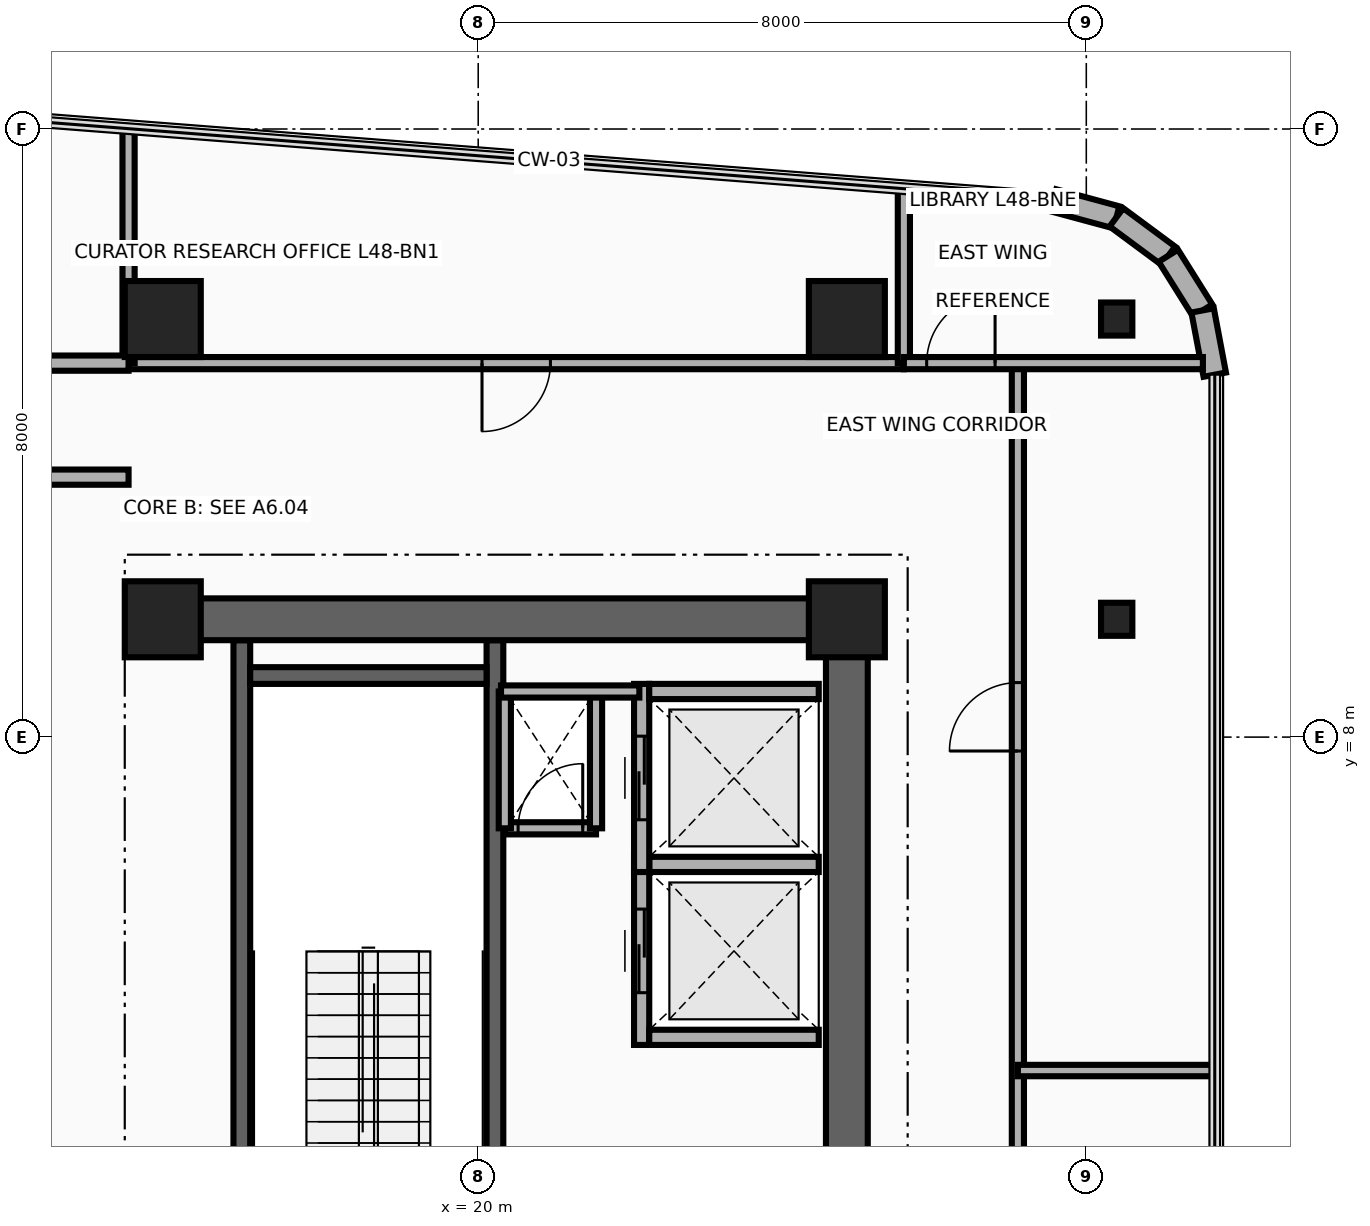
"""IFC4 building model, lengths in metres.
Left out: names, types, materials, properties, quantities, classifications, styles, units other than length and angle.
Written with IfcOpenShell. Run it as: python <this file> out.ifc"""

import sys

from ifc_helpers import new_model, si_unit, direction, frame, frame_2d, origin, origin_2d, place, context, subcontext, project, spatial, rectangle, i_section, extrude, source, transform, mapped, element, fill, save


model = new_model("IFC4")
c1 = context("Model", 3, precision=1e-05, world=origin(), true_north=direction((0.0, 1.0)))
c2 = subcontext(c1, "Body", "Model", "MODEL_VIEW")
j1 = project(units=[si_unit("LENGTHUNIT", "METRE"), si_unit("PLANEANGLEUNIT", "RADIAN")], contexts=[c1])
p1 = place(None, origin())
s1 = spatial("IfcSite", under=j1, at=p1, CompositionType="ELEMENT")
p2 = place(p1, origin())
s2 = spatial("IfcBuilding", under=s1, at=p2, CompositionType="ELEMENT")
p3 = place(p2, frame((0.0, 0.0, 188.4)))
s3 = spatial("IfcBuildingStorey", under=s2, at=p3, CompositionType="ELEMENT", Elevation=188.4)
for number, where, z_axis, x_axis in (
    (1, (16.89, 0.68, 0.0), (0.0, 0.0, 1.0), (0.0, 1.0, 0.0)),
    (2, (20.22, 0.68, 0.0), (0.0, 0.0, 1.0), (0.0, 1.0, 0.0)),
):
    element("IfcWall", number, at=place(p3, frame(where, z_axis=z_axis, x_axis=x_axis)), inside=s3, PredefinedType="SHEAR", context=c2, shape_type="SweptSolid", body=[
        extrude(rectangle(XDim=8.595, YDim=0.22, at=frame_2d((4.297, 0.0))), origin(), (0.0, 0.0, 1.0), 3.63),
    ])
p4 = place(p3, frame((17.0, 8.81, 0.0), z_axis=(0.0, 0.0, 1.0), x_axis=(1.0, 0.0, 0.0)))
e3 = element("IfcWall", 3, at=p4, inside=s3, PredefinedType="SHEAR", context=c2, shape_type="SweptSolid", body=[
    extrude(rectangle(XDim=3.11, YDim=0.22, at=frame_2d((1.555, 0.0))), origin(), (0.0, 0.0, 1.0), 3.63),
])
p5 = place(p3, frame((24.85, 0.95, 0.0), z_axis=(0.0, 0.0, 1.0), x_axis=(0.0, 1.0, 0.0)))
e4 = element("IfcWall", 4, at=p5, inside=s3, PredefinedType="SHEAR", context=c2, shape_type="SweptSolid", body=[
    extrude(rectangle(XDim=8.875, YDim=0.55, at=frame_2d((4.438, 0.0))), origin(), (0.0, 0.0, 1.0), 3.63),
])
p6 = place(p3, frame((15.85, 9.55, 0.0), z_axis=(0.0, 0.0, 1.0), x_axis=(1.0, 0.0, 0.0)))
e5 = element("IfcWall", 5, at=p6, inside=s3, PredefinedType="SHEAR", context=c2, shape_type="SweptSolid", body=[
    extrude(rectangle(XDim=9.0, YDim=0.55, at=frame_2d((4.5, 0.0))), origin(), (0.0, 0.0, 1.0), 3.63),
])
m1 = source(origin(), c2, "Body", "SweptSolid", [
    extrude(rectangle(XDim=1.0, YDim=1.0, at=origin_2d()), origin(), (0.0, 0.0, 1.0), 3.95),
])
for number, where, z_axis, x_axis in (
    (6, (15.85, 9.55, 0.0), (0.0, 0.0, 1.0), (1.0, 0.0, 0.0)),
    (7, (24.85, 9.55, 0.0), (0.0, 0.0, 1.0), (1.0, 0.0, 0.0)),
):
    element("IfcColumn", number, at=place(p3, frame(where, z_axis=z_axis, x_axis=x_axis)), inside=s3, PredefinedType="COLUMN", context=c2, shape_type="MappedRepresentation", body=[
        mapped(m1, transform((0.0, 0.0, 0.0), x_axis=(1.0, 0.0, 0.0), y_axis=(0.0, 1.0, 0.0), z_axis=(0.0, 0.0, 1.0), scale=1.0)),
    ])
m2 = source(origin(), c2, "Body", "SweptSolid", [
    extrude(i_section(OverallWidth=0.412, OverallDepth=0.435, WebThickness=0.036, FlangeThickness=0.057, at=origin_2d()), origin(), (0.0, 0.0, 1.0), 3.95),
])
p7 = place(p3, frame((28.4, 9.55, 0.0), z_axis=(0.0, 0.0, 1.0), x_axis=(1.0, 0.0, 0.0)))
e8 = element("IfcColumn", 8, at=p7, inside=s3, PredefinedType="COLUMN", context=c2, shape_type="MappedRepresentation", body=[
    mapped(m2, transform((0.0, 0.0, 0.0), x_axis=(1.0, 0.0, 0.0), y_axis=(0.0, 1.0, 0.0), z_axis=(0.0, 0.0, 1.0), scale=1.0)),
])
for number, where, z_axis, x_axis in (
    (9, (15.85, 13.5, 0.0), (0.0, 0.0, 1.0), (1.0, 0.0, 0.0)),
    (10, (24.85, 13.5, 0.0), (0.0, 0.0, 1.0), (1.0, 0.0, 0.0)),
):
    element("IfcColumn", number, at=place(p3, frame(where, z_axis=z_axis, x_axis=x_axis)), inside=s3, PredefinedType="COLUMN", context=c2, shape_type="MappedRepresentation", body=[
        mapped(m1, transform((0.0, 0.0, 0.0), x_axis=(1.0, 0.0, 0.0), y_axis=(0.0, 1.0, 0.0), z_axis=(0.0, 0.0, 1.0), scale=1.0)),
    ])
p8 = place(p3, frame((28.4, 13.5, 0.0), z_axis=(0.0, 0.0, 1.0), x_axis=(1.0, 0.0, 0.0)))
e11 = element("IfcColumn", 11, at=p8, inside=s3, PredefinedType="COLUMN", context=c2, shape_type="MappedRepresentation", body=[
    mapped(m2, transform((0.0, 0.0, 0.0), x_axis=(1.0, 0.0, 0.0), y_axis=(0.0, 1.0, 0.0), z_axis=(0.0, 0.0, 1.0), scale=1.0)),
])
p9 = place(p3, frame((27.566, 15.062, 0.0), z_axis=(0.0, 0.0, 1.0), x_axis=(0.965357594382, -0.260930479187, 0.0)))
e12 = element("IfcWall", 12, at=p9, inside=s3, PredefinedType="SOLIDWALL", context=c2, shape_type="SweptSolid", body=[
    extrude(rectangle(XDim=0.86, YDim=0.3, at=frame_2d((0.43, 0.0))), origin(), (0.0, 0.0, 1.0), 3.63),
])
p10 = place(p3, frame((28.396, 14.838, 0.0), z_axis=(0.0, 0.0, 1.0), x_axis=(0.803847397988, -0.594835574548, 0.0)))
e13 = element("IfcWall", 13, at=p10, inside=s3, PredefinedType="SOLIDWALL", context=c2, shape_type="SweptSolid", body=[
    extrude(rectangle(XDim=0.849, YDim=0.3, at=frame_2d((0.425, 0.0))), origin(), (0.0, 0.0, 1.0), 3.63),
])
p11 = place(p3, frame((29.079, 14.333, 0.0), z_axis=(0.0, 0.0, 1.0), x_axis=(0.53134147342, -0.847157741288, 0.0)))
e14 = element("IfcWall", 14, at=p11, inside=s3, PredefinedType="SOLIDWALL", context=c2, shape_type="SweptSolid", body=[
    extrude(rectangle(XDim=0.85, YDim=0.3, at=frame_2d((0.425, 0.0))), origin(), (0.0, 0.0, 1.0), 3.63),
])
p12 = place(p3, frame((29.531, 13.613, 0.0), z_axis=(0.0, 0.0, 1.0), x_axis=(0.185402686284, -0.982662629756, 0.0)))
e15 = element("IfcWall", 15, at=p12, inside=s3, PredefinedType="SOLIDWALL", context=c2, shape_type="SweptSolid", body=[
    extrude(rectangle(XDim=0.86, YDim=0.3, at=frame_2d((0.43, 0.0))), origin(), (0.0, 0.0, 1.0), 3.63),
])
p13 = place(p3, frame((22.15, 3.95, 0.0), z_axis=(0.0, 0.0, 1.0), x_axis=(0.0, 1.0, 0.0)))
e16 = element("IfcWall", 16, at=p13, inside=s3, PredefinedType="MOVABLE", context=c2, shape_type="SweptSolid", body=[
    extrude(rectangle(XDim=2.475, YDim=0.2, at=frame_2d((1.238, 0.0))), origin(), (0.0, 0.0, 1.0), 3.63),
])
p14 = place(p13, frame((0.688, 0.0, 0.0)))
e17 = element("IfcOpeningElement", 17, at=p14, cuts=e16, PredefinedType="OPENING", context=c2, shape_type="SweptSolid", body=[
    extrude(rectangle(XDim=1.1, YDim=2.1, at=frame_2d((0.55, 1.05))), frame((0.0, 0.115, 0.0), z_axis=(0.0, -1.0, 0.0), x_axis=(1.0, 0.0, 0.0)), (0.0, 0.0, 1.0), 0.23),
])
for number, where, z_axis, x_axis in (
    (18, (22.25, 4.05, 0.0), (0.0, 0.0, 1.0), (1.0, 0.0, 0.0)),
    (19, (22.25, 6.325, 0.0), (0.0, 0.0, 1.0), (1.0, 0.0, 0.0)),
):
    element("IfcWall", number, at=place(p3, frame(where, z_axis=z_axis, x_axis=x_axis)), inside=s3, PredefinedType="MOVABLE", context=c2, shape_type="SweptSolid", body=[
        extrude(rectangle(XDim=2.23, YDim=0.2, at=frame_2d((1.115, 0.0))), origin(), (0.0, 0.0, 1.0), 3.63),
    ])
p15 = place(p3, frame((22.15, 6.225, 0.0), z_axis=(0.0, 0.0, 1.0), x_axis=(0.0, 1.0, 0.0)))
e20 = element("IfcWall", 20, at=p15, inside=s3, PredefinedType="MOVABLE", context=c2, shape_type="SweptSolid", body=[
    extrude(rectangle(XDim=2.475, YDim=0.2, at=frame_2d((1.237, 0.0))), origin(), (0.0, 0.0, 1.0), 3.63),
])
p16 = place(p15, frame((0.688, 0.0, 0.0)))
e21 = element("IfcOpeningElement", 21, at=p16, cuts=e20, PredefinedType="OPENING", context=c2, shape_type="SweptSolid", body=[
    extrude(rectangle(XDim=1.1, YDim=2.1, at=frame_2d((0.55, 1.05))), frame((0.0, 0.115, 0.0), z_axis=(0.0, -1.0, 0.0), x_axis=(1.0, 0.0, 0.0)), (0.0, 0.0, 1.0), 0.23),
])
p17 = place(p3, frame((22.25, 8.6, 0.0), z_axis=(0.0, 0.0, 1.0), x_axis=(1.0, 0.0, 0.0)))
e22 = element("IfcWall", 22, at=p17, inside=s3, PredefinedType="MOVABLE", context=c2, shape_type="SweptSolid", body=[
    extrude(rectangle(XDim=2.23, YDim=0.2, at=frame_2d((1.115, 0.0))), origin(), (0.0, 0.0, 1.0), 3.63),
])
p18 = place(p3, frame((20.35, 6.8, 0.0), z_axis=(0.0, 0.0, 1.0), x_axis=(1.0, 0.0, 0.0)))
e23 = element("IfcWall", 23, at=p18, inside=s3, PredefinedType="PARTITIONING", context=c2, shape_type="SweptSolid", body=[
    extrude(rectangle(XDim=1.2, YDim=0.16, at=frame_2d((0.6, 0.0))), origin(), (0.0, 0.0, 1.0), 3.63),
])
p19 = place(p18, frame((0.175, 0.0, 0.0)))
e24 = element("IfcOpeningElement", 24, at=p19, cuts=e23, PredefinedType="OPENING", context=c2, shape_type="SweptSolid", body=[
    extrude(rectangle(XDim=0.85, YDim=2.05, at=frame_2d((0.425, 1.025))), frame((0.0, 0.095, 0.0), z_axis=(0.0, -1.0, 0.0), x_axis=(1.0, 0.0, 0.0)), (0.0, 0.0, 1.0), 0.19),
])
for number, where, z_axis, x_axis in (
    (25, (21.55, 6.8, 0.0), (0.0, 0.0, 1.0), (0.0, 1.0, 0.0)),
    (26, (20.35, 6.8, 0.0), (0.0, 0.0, 1.0), (0.0, 1.0, 0.0)),
):
    element("IfcWall", number, at=place(p3, frame(where, z_axis=z_axis, x_axis=x_axis)), inside=s3, PredefinedType="PARTITIONING", context=c2, shape_type="SweptSolid", body=[
        extrude(rectangle(XDim=1.8, YDim=0.16, at=frame_2d((0.9, 0.0))), origin(), (0.0, 0.0, 1.0), 3.63),
    ])
p20 = place(p3, frame((20.3, 8.6, 0.0), z_axis=(0.0, 0.0, 1.0), x_axis=(1.0, 0.0, 0.0)))
e27 = element("IfcWall", 27, at=p20, inside=s3, PredefinedType="PARTITIONING", context=c2, shape_type="SweptSolid", body=[
    extrude(rectangle(XDim=1.82, YDim=0.16, at=frame_2d((0.91, 0.0))), origin(), (0.0, 0.0, 1.0), 3.63),
])
p21 = place(p3, frame((15.4, 12.92, 0.0), z_axis=(0.0, 0.0, 1.0), x_axis=(1.0, 0.0, 0.0)))
e28 = element("IfcWall", 28, at=p21, inside=s3, PredefinedType="PARTITIONING", context=c2, shape_type="SweptSolid", body=[
    extrude(rectangle(XDim=10.2, YDim=0.16, at=frame_2d((5.1, 0.0))), origin(), (0.0, 0.0, 1.0), 3.004),
])
p22 = place(p21, frame((4.65, 0.0, 0.0)))
e29 = element("IfcOpeningElement", 29, at=p22, cuts=e28, PredefinedType="OPENING", context=c2, shape_type="SweptSolid", body=[
    extrude(rectangle(XDim=0.9, YDim=2.1, at=frame_2d((0.45, 1.05))), frame((0.0, 0.095, 0.0), z_axis=(0.0, -1.0, 0.0), x_axis=(1.0, 0.0, 0.0)), (0.0, 0.0, 1.0), 0.19),
])
p23 = place(p3, frame((15.4, 12.92, 0.0), z_axis=(0.0, 0.0, 1.0), x_axis=(0.0, 1.0, 0.0)))
e30 = element("IfcWall", 30, at=p23, inside=s3, PredefinedType="PARTITIONING", context=c2, shape_type="SweptSolid", body=[
    extrude(rectangle(XDim=3.084, YDim=0.16, at=frame_2d((1.542, 0.0))), origin(), (0.0, 0.0, 1.0), 2.665),
])
p24 = place(p3, frame((25.6, 12.92, 0.0), z_axis=(0.0, 0.0, 1.0), x_axis=(0.0, 1.0, 0.0)))
e31 = element("IfcWall", 31, at=p24, inside=s3, PredefinedType="PARTITIONING", context=c2, shape_type="SweptSolid", body=[
    extrude(rectangle(XDim=2.295, YDim=0.16, at=frame_2d((1.147, 0.0))), origin(), (0.0, 0.0, 1.0), 2.665),
])
p25 = place(p3, frame((27.1, -11.89, 0.0), z_axis=(0.0, 0.0, 1.0), x_axis=(0.0, 1.0, 0.0)))
e32 = element("IfcWall", 32, at=p25, inside=s3, PredefinedType="PARTITIONING", context=c2, shape_type="SweptSolid", body=[
    extrude(rectangle(XDim=24.81, YDim=0.16, at=frame_2d((12.405, 0.0))), origin(), (0.0, 0.0, 1.0), 2.665),
])
p26 = place(p25, frame((2.648, 0.0, 0.0)))
e33 = element("IfcOpeningElement", 33, at=p26, cuts=e32, PredefinedType="OPENING", context=c2, shape_type="SweptSolid", body=[
    extrude(rectangle(XDim=0.9, YDim=2.1, at=frame_2d((0.45, 1.05))), frame((0.0, 0.095, 0.0), z_axis=(0.0, -1.0, 0.0), x_axis=(1.0, 0.0, 0.0)), (0.0, 0.0, 1.0), 0.19),
])
p27 = place(p25, frame((10.4, 0.0, 0.0)))
e34 = element("IfcOpeningElement", 34, at=p27, cuts=e32, PredefinedType="OPENING", context=c2, shape_type="SweptSolid", body=[
    extrude(rectangle(XDim=0.9, YDim=2.1, at=frame_2d((0.45, 1.05))), frame((0.0, 0.095, 0.0), z_axis=(0.0, -1.0, 0.0), x_axis=(1.0, 0.0, 0.0)), (0.0, 0.0, 1.0), 0.19),
])
p28 = place(p25, frame((19.707, 0.0, 0.0)))
e35 = element("IfcOpeningElement", 35, at=p28, cuts=e32, PredefinedType="OPENING", context=c2, shape_type="SweptSolid", body=[
    extrude(rectangle(XDim=0.9, YDim=2.1, at=frame_2d((0.45, 1.05))), frame((0.0, 0.095, 0.0), z_axis=(0.0, -1.0, 0.0), x_axis=(1.0, 0.0, 0.0)), (0.0, 0.0, 1.0), 0.19),
])
p29 = place(p3, frame((25.6, 12.92, 0.0), z_axis=(0.0, 0.0, 1.0), x_axis=(1.0, 0.0, 0.0)))
e36 = element("IfcWall", 36, at=p29, inside=s3, PredefinedType="PARTITIONING", context=c2, shape_type="SweptSolid", body=[
    extrude(rectangle(XDim=3.934, YDim=0.16, at=frame_2d((1.967, 0.0))), origin(), (0.0, 0.0, 1.0), 3.076),
])
p30 = place(p29, frame((0.3, 0.0, 0.0)))
e37 = element("IfcOpeningElement", 37, at=p30, cuts=e36, PredefinedType="OPENING", context=c2, shape_type="SweptSolid", body=[
    extrude(rectangle(XDim=0.9, YDim=2.1, at=frame_2d((0.45, 1.05))), frame((0.0, 0.095, 0.0), z_axis=(0.0, -1.0, 0.0), x_axis=(1.0, 0.0, 0.0)), (0.0, 0.0, 1.0), 0.19),
])
p31 = place(p3, frame((27.1, 3.613, 0.0), z_axis=(0.0, 0.0, 1.0), x_axis=(1.0, 0.0, 0.0)))
e38 = element("IfcWall", 38, at=p31, inside=s3, PredefinedType="PARTITIONING", context=c2, shape_type="SweptSolid", body=[
    extrude(rectangle(XDim=2.59, YDim=0.15, at=frame_2d((1.295, 0.0))), origin(), (0.0, 0.0, 1.0), 3.076),
])
for number, where, z_axis, x_axis in (
    (39, (13.42, 12.92, 0.0), (0.0, 0.0, 1.0), (1.0, 0.0, 0.0)),
    (40, (13.42, 11.42, 0.0), (0.0, 0.0, 1.0), (1.0, 0.0, 0.0)),
):
    element("IfcWall", number, at=place(p3, frame(where, z_axis=z_axis, x_axis=x_axis)), inside=s3, PredefinedType="PARTITIONING", context=c2, shape_type="SweptSolid", body=[
        extrude(rectangle(XDim=1.98, YDim=0.2, at=frame_2d((0.99, 0.0))), origin(), (0.0, 0.0, 1.0), 3.004),
    ])
p32 = place(p14, origin())
e41 = element("IfcDoor", 41, at=p32, inside=s3, OperationType="DOUBLE_DOOR_SLIDING", PredefinedType="DOOR", context=c2, shape_type="SweptSolid", body=[
    extrude(rectangle(XDim=1.1, YDim=2.1, at=frame_2d((0.55, 1.05))), frame((0.0, 0.025, 0.0), z_axis=(0.0, -1.0, 0.0), x_axis=(1.0, 0.0, 0.0)), (0.0, 0.0, 1.0), 0.05),
])
fill(e17, e41)
p33 = place(p16, origin())
e42 = element("IfcDoor", 42, at=p33, inside=s3, OperationType="DOUBLE_DOOR_SLIDING", PredefinedType="DOOR", context=c2, shape_type="SweptSolid", body=[
    extrude(rectangle(XDim=1.1, YDim=2.1, at=frame_2d((0.55, 1.05))), frame((0.0, 0.025, 0.0), z_axis=(0.0, -1.0, 0.0), x_axis=(1.0, 0.0, 0.0)), (0.0, 0.0, 1.0), 0.05),
])
fill(e21, e42)
p34 = place(p19, origin())
e43 = element("IfcDoor", 43, at=p34, inside=s3, OperationType="SINGLE_SWING_RIGHT", PredefinedType="DOOR", context=c2, shape_type="SweptSolid", body=[
    extrude(rectangle(XDim=0.85, YDim=2.05, at=frame_2d((0.425, 1.025))), frame((0.0, 0.025, 0.0), z_axis=(0.0, -1.0, 0.0), x_axis=(1.0, 0.0, 0.0)), (0.0, 0.0, 1.0), 0.05),
])
fill(e24, e43)
p35 = place(p22, frame((0.9, 0.0, 0.0), z_axis=(0.0, 0.0, 1.0), x_axis=(-1.0, 0.0, 0.0)))
e44 = element("IfcDoor", 44, at=p35, inside=s3, OperationType="SINGLE_SWING_LEFT", PredefinedType="DOOR", context=c2, shape_type="SweptSolid", body=[
    extrude(rectangle(XDim=0.9, YDim=2.1, at=frame_2d((0.45, 1.05))), frame((0.0, 0.025, 0.0), z_axis=(0.0, -1.0, 0.0), x_axis=(1.0, 0.0, 0.0)), (0.0, 0.0, 1.0), 0.05),
])
fill(e29, e44)
p36 = place(p30, origin())
e45 = element("IfcDoor", 45, at=p36, inside=s3, OperationType="SINGLE_SWING_LEFT", PredefinedType="DOOR", context=c2, shape_type="SweptSolid", body=[
    extrude(rectangle(XDim=0.9, YDim=2.1, at=frame_2d((0.45, 1.05))), frame((0.0, 0.025, 0.0), z_axis=(0.0, -1.0, 0.0), x_axis=(1.0, 0.0, 0.0)), (0.0, 0.0, 1.0), 0.05),
])
fill(e37, e45)
p37 = place(p28, origin())
e46 = element("IfcDoor", 46, at=p37, inside=s3, OperationType="SINGLE_SWING_RIGHT", PredefinedType="DOOR", context=c2, shape_type="SweptSolid", body=[
    extrude(rectangle(XDim=0.9, YDim=2.1, at=frame_2d((0.45, 1.05))), frame((0.0, 0.025, 0.0), z_axis=(0.0, -1.0, 0.0), x_axis=(1.0, 0.0, 0.0)), (0.0, 0.0, 1.0), 0.05),
])
fill(e35, e46)
save(model, sys.argv[1])
